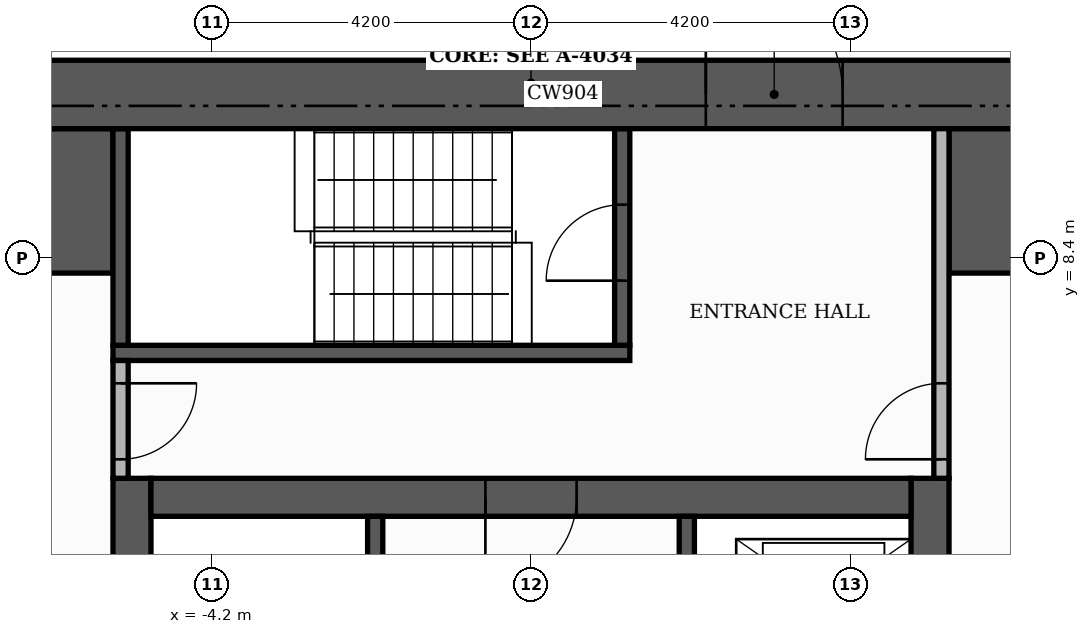
"""IFC4 building model, lengths in metres.
Left out: names, types, materials, properties, quantities, classifications, styles, units other than length and angle.
Written with IfcOpenShell. Run it as: python <this file> out.ifc"""

import sys

from ifc_helpers import new_model, si_unit, direction, frame, frame_2d, origin, place, context, subcontext, project, spatial, rectangle, extrude, element, fill, save


model = new_model("IFC4")
c1 = context("Model", 3, precision=1e-05, world=origin(), true_north=direction((0.0, 1.0)))
c2 = subcontext(c1, "Body", "Model", "MODEL_VIEW")
j1 = project(units=[si_unit("LENGTHUNIT", "METRE"), si_unit("PLANEANGLEUNIT", "RADIAN")], contexts=[c1])
p1 = place(None, origin())
s1 = spatial("IfcSite", under=j1, at=p1, CompositionType="ELEMENT")
p2 = place(p1, origin())
s2 = spatial("IfcBuilding", under=s1, at=p2, CompositionType="ELEMENT")
p3 = place(p2, frame((0.0, 0.0, 204.0)))
s3 = spatial("IfcBuildingStorey", under=s2, at=p3, CompositionType="ELEMENT", Elevation=204.0)
for number, where, z_axis, x_axis in (
    (1, (-5.25, -5.0, 0.0), (0.0, 0.0, 1.0), (0.0, 1.0, 0.0)),
    (2, (5.25, -5.0, 0.0), (0.0, 0.0, 1.0), (0.0, 1.0, 0.0)),
):
    element("IfcWall", number, at=place(p3, frame(where, z_axis=z_axis, x_axis=x_axis)), inside=s3, PredefinedType="SHEAR", context=c2, shape_type="SweptSolid", body=[
        extrude(rectangle(XDim=10.5, YDim=0.5, at=frame_2d((5.25, 0.0))), origin(), (0.0, 0.0, 1.0), 3.48),
    ])
p4 = place(p3, frame((-5.0, 5.25, 0.0), z_axis=(0.0, 0.0, 1.0), x_axis=(1.0, 0.0, 0.0)))
e3 = element("IfcWall", 3, at=p4, inside=s3, PredefinedType="SHEAR", context=c2, shape_type="SweptSolid", body=[
    extrude(rectangle(XDim=10.0, YDim=0.5, at=frame_2d((5.0, 0.0))), origin(), (0.0, 0.0, 1.0), 3.48),
])
p5 = place(p4, frame((4.4, 0.0, 0.0)))
e4 = element("IfcOpeningElement", 4, at=p5, cuts=e3, PredefinedType="OPENING", context=c2, shape_type="SweptSolid", body=[
    extrude(rectangle(XDim=1.2, YDim=2.1, at=frame_2d((0.6, 1.05))), frame((0.0, 0.26, 0.0), z_axis=(0.0, -1.0, 0.0), x_axis=(1.0, 0.0, 0.0)), (0.0, 0.0, 1.0), 0.52),
])
for number, where, z_axis, x_axis in (
    (5, (-10.1, 9.15, 0.0), (0.0, 0.0, 1.0), (1.0, 0.0, 0.0)),
    (6, (5.5, 9.15, 0.0), (0.0, 0.0, 1.0), (1.0, 0.0, 0.0)),
):
    element("IfcWall", number, at=place(p3, frame(where, z_axis=z_axis, x_axis=x_axis)), inside=s3, PredefinedType="SHEAR", context=c2, shape_type="SweptSolid", body=[
        extrude(rectangle(XDim=4.6, YDim=1.9, at=frame_2d((2.3, 0.0))), origin(), (0.0, 0.0, 1.0), 3.48),
    ])
p6 = place(p3, frame((-2.05, -1.4, 0.0), z_axis=(0.0, 0.0, 1.0), x_axis=(0.0, 1.0, 0.0)))
e7 = element("IfcWall", 7, at=p6, inside=s3, PredefinedType="SHEAR", context=c2, shape_type="SweptSolid", body=[
    extrude(rectangle(XDim=6.4, YDim=0.2, at=frame_2d((3.2, 0.0))), origin(), (0.0, 0.0, 1.0), 3.48),
])
p7 = place(p6, frame((0.15, 0.0, 0.0)))
e8 = element("IfcOpeningElement", 8, at=p7, cuts=e7, PredefinedType="OPENING", context=c2, shape_type="SweptSolid", body=[
    extrude(rectangle(XDim=1.0, YDim=2.1, at=frame_2d((0.5, 1.05))), frame((0.0, 0.11, 0.0), z_axis=(0.0, -1.0, 0.0), x_axis=(1.0, 0.0, 0.0)), (0.0, 0.0, 1.0), 0.22),
])
p8 = place(p3, frame((-5.5, 7.15, 0.0), z_axis=(0.0, 0.0, 1.0), x_axis=(1.0, 0.0, 0.0)))
e9 = element("IfcWall", 9, at=p8, inside=s3, PredefinedType="SHEAR", context=c2, shape_type="SweptSolid", body=[
    extrude(rectangle(XDim=6.8, YDim=0.2, at=frame_2d((3.4, 0.0))), origin(), (0.0, 0.0, 1.0), 3.48),
])
p9 = place(p3, frame((-5.4, 7.25, 0.0), z_axis=(0.0, 0.0, 1.0), x_axis=(0.0, 1.0, 0.0)))
e10 = element("IfcWall", 10, at=p9, inside=s3, PredefinedType="SHEAR", context=c2, shape_type="SweptSolid", body=[
    extrude(rectangle(XDim=2.85, YDim=0.2, at=frame_2d((1.425, 0.0))), origin(), (0.0, 0.0, 1.0), 3.48),
])
p10 = place(p3, frame((1.2, 7.25, 0.0), z_axis=(0.0, 0.0, 1.0), x_axis=(0.0, 1.0, 0.0)))
e11 = element("IfcWall", 11, at=p10, inside=s3, PredefinedType="SHEAR", context=c2, shape_type="SweptSolid", body=[
    extrude(rectangle(XDim=2.85, YDim=0.2, at=frame_2d((1.425, 0.0))), origin(), (0.0, 0.0, 1.0), 3.48),
])
p11 = place(p10, frame((0.85, 0.0, 0.0)))
e12 = element("IfcOpeningElement", 12, at=p11, cuts=e11, PredefinedType="OPENING", context=c2, shape_type="SweptSolid", body=[
    extrude(rectangle(XDim=1.0, YDim=2.1, at=frame_2d((0.5, 1.05))), frame((0.0, 0.11, 0.0), z_axis=(0.0, -1.0, 0.0), x_axis=(1.0, 0.0, 0.0)), (0.0, 0.0, 1.0), 0.22),
])
p12 = place(p3, frame((2.05, 1.6, 0.0), z_axis=(0.0, 0.0, 1.0), x_axis=(0.0, 1.0, 0.0)))
e13 = element("IfcWall", 13, at=p12, inside=s3, PredefinedType="SHEAR", context=c2, shape_type="SweptSolid", body=[
    extrude(rectangle(XDim=3.4, YDim=0.2, at=frame_2d((1.7, 0.0))), origin(), (0.0, 0.0, 1.0), 3.48),
])
p13 = place(p12, frame((1.75, 0.0, 0.0)))
e14 = element("IfcOpeningElement", 14, at=p13, cuts=e13, PredefinedType="OPENING", context=c2, shape_type="SweptSolid", body=[
    extrude(rectangle(XDim=1.1, YDim=2.1, at=frame_2d((0.55, 1.05))), frame((0.0, 0.11, 0.0), z_axis=(0.0, -1.0, 0.0), x_axis=(1.0, 0.0, 0.0)), (0.0, 0.0, 1.0), 0.22),
])
p14 = place(p12, frame((0.15, 0.0, 0.0)))
e15 = element("IfcOpeningElement", 15, at=p14, cuts=e13, PredefinedType="OPENING", context=c2, shape_type="SweptSolid", body=[
    extrude(rectangle(XDim=0.8, YDim=2.1, at=frame_2d((0.4, 1.05))), frame((0.0, 0.11, 0.0), z_axis=(0.0, -1.0, 0.0), x_axis=(1.0, 0.0, 0.0)), (0.0, 0.0, 1.0), 0.22),
])
p15 = place(p3, frame((-11.0, 10.55, 0.0), z_axis=(0.0, 0.0, 1.0), x_axis=(1.0, 0.0, 0.0)))
e16 = element("IfcWall", 16, at=p15, inside=s3, PredefinedType="SHEAR", context=c2, shape_type="SweptSolid", body=[
    extrude(rectangle(XDim=22.0, YDim=0.9, at=frame_2d((11.0, 0.0))), origin(), (0.0, 0.0, 1.0), 3.48),
])
p16 = place(p15, frame((13.3, 0.0, 0.0)))
e17 = element("IfcOpeningElement", 17, at=p16, cuts=e16, PredefinedType="OPENING", context=c2, shape_type="SweptSolid", body=[
    extrude(rectangle(XDim=1.8, YDim=2.2, at=frame_2d((0.9, 1.1))), frame((0.0, 0.46, 0.0), z_axis=(0.0, -1.0, 0.0), x_axis=(1.0, 0.0, 0.0)), (0.0, 0.0, 1.0), 0.92),
])
p17 = place(p3, frame((-5.4, 5.5, 0.0), z_axis=(0.0, 0.0, 1.0), x_axis=(0.0, 1.0, 0.0)))
e18 = element("IfcWall", 18, at=p17, inside=s3, PredefinedType="PARTITIONING", context=c2, shape_type="SweptSolid", body=[
    extrude(rectangle(XDim=1.55, YDim=0.2, at=frame_2d((0.775, 0.0))), origin(), (0.0, 0.0, 1.0), 3.48),
])
p18 = place(p17, frame((0.25, 0.0, 0.0)))
e19 = element("IfcOpeningElement", 19, at=p18, cuts=e18, PredefinedType="OPENING", context=c2, shape_type="SweptSolid", body=[
    extrude(rectangle(XDim=1.0, YDim=2.1, at=frame_2d((0.5, 1.05))), frame((0.0, 0.11, 0.0), z_axis=(0.0, -1.0, 0.0), x_axis=(1.0, 0.0, 0.0)), (0.0, 0.0, 1.0), 0.22),
])
p19 = place(p3, frame((5.4, 5.5, 0.0), z_axis=(0.0, 0.0, 1.0), x_axis=(0.0, 1.0, 0.0)))
e20 = element("IfcWall", 20, at=p19, inside=s3, PredefinedType="PARTITIONING", context=c2, shape_type="SweptSolid", body=[
    extrude(rectangle(XDim=4.6, YDim=0.2, at=frame_2d((2.3, 0.0))), origin(), (0.0, 0.0, 1.0), 3.48),
])
p20 = place(p19, frame((0.25, 0.0, 0.0)))
e21 = element("IfcOpeningElement", 21, at=p20, cuts=e20, PredefinedType="OPENING", context=c2, shape_type="SweptSolid", body=[
    extrude(rectangle(XDim=1.0, YDim=2.1, at=frame_2d((0.5, 1.05))), frame((0.0, 0.11, 0.0), z_axis=(0.0, -1.0, 0.0), x_axis=(1.0, 0.0, 0.0)), (0.0, 0.0, 1.0), 0.22),
])
p21 = place(p5, frame((1.2, 0.0, 0.0), z_axis=(0.0, 0.0, 1.0), x_axis=(-1.0, 0.0, 0.0)))
e22 = element("IfcDoor", 22, at=p21, inside=s3, OperationType="SINGLE_SWING_LEFT", PredefinedType="DOOR", context=c2, shape_type="SweptSolid", body=[
    extrude(rectangle(XDim=1.2, YDim=2.1, at=frame_2d((0.6, 1.05))), frame((0.0, 0.025, 0.0), z_axis=(0.0, -1.0, 0.0), x_axis=(1.0, 0.0, 0.0)), (0.0, 0.0, 1.0), 0.05),
])
fill(e4, e22)
p22 = place(p11, origin())
e23 = element("IfcDoor", 23, at=p22, inside=s3, OperationType="SINGLE_SWING_LEFT", PredefinedType="DOOR", context=c2, shape_type="SweptSolid", body=[
    extrude(rectangle(XDim=1.0, YDim=2.1, at=frame_2d((0.5, 1.05))), frame((0.0, 0.025, 0.0), z_axis=(0.0, -1.0, 0.0), x_axis=(1.0, 0.0, 0.0)), (0.0, 0.0, 1.0), 0.05),
])
fill(e12, e23)
p23 = place(p18, frame((1.0, 0.0, 0.0), z_axis=(0.0, 0.0, 1.0), x_axis=(-1.0, 0.0, 0.0)))
e24 = element("IfcDoor", 24, at=p23, inside=s3, OperationType="SINGLE_SWING_RIGHT", PredefinedType="DOOR", context=c2, shape_type="SweptSolid", body=[
    extrude(rectangle(XDim=1.0, YDim=2.1, at=frame_2d((0.5, 1.05))), frame((0.0, 0.025, 0.0), z_axis=(0.0, -1.0, 0.0), x_axis=(1.0, 0.0, 0.0)), (0.0, 0.0, 1.0), 0.05),
])
fill(e19, e24)
p24 = place(p20, origin())
e25 = element("IfcDoor", 25, at=p24, inside=s3, OperationType="SINGLE_SWING_LEFT", PredefinedType="DOOR", context=c2, shape_type="SweptSolid", body=[
    extrude(rectangle(XDim=1.0, YDim=2.1, at=frame_2d((0.5, 1.05))), frame((0.0, 0.025, 0.0), z_axis=(0.0, -1.0, 0.0), x_axis=(1.0, 0.0, 0.0)), (0.0, 0.0, 1.0), 0.05),
])
fill(e21, e25)
p25 = place(p16, origin())
e26 = element("IfcDoor", 26, at=p25, inside=s3, OperationType="DOUBLE_DOOR_SINGLE_SWING", PredefinedType="DOOR", context=c2, shape_type="SweptSolid", body=[
    extrude(rectangle(XDim=1.8, YDim=2.2, at=frame_2d((0.9, 1.1))), frame((0.0, 0.025, 0.0), z_axis=(0.0, -1.0, 0.0), x_axis=(1.0, 0.0, 0.0)), (0.0, 0.0, 1.0), 0.05),
])
fill(e17, e26)
save(model, sys.argv[1])
